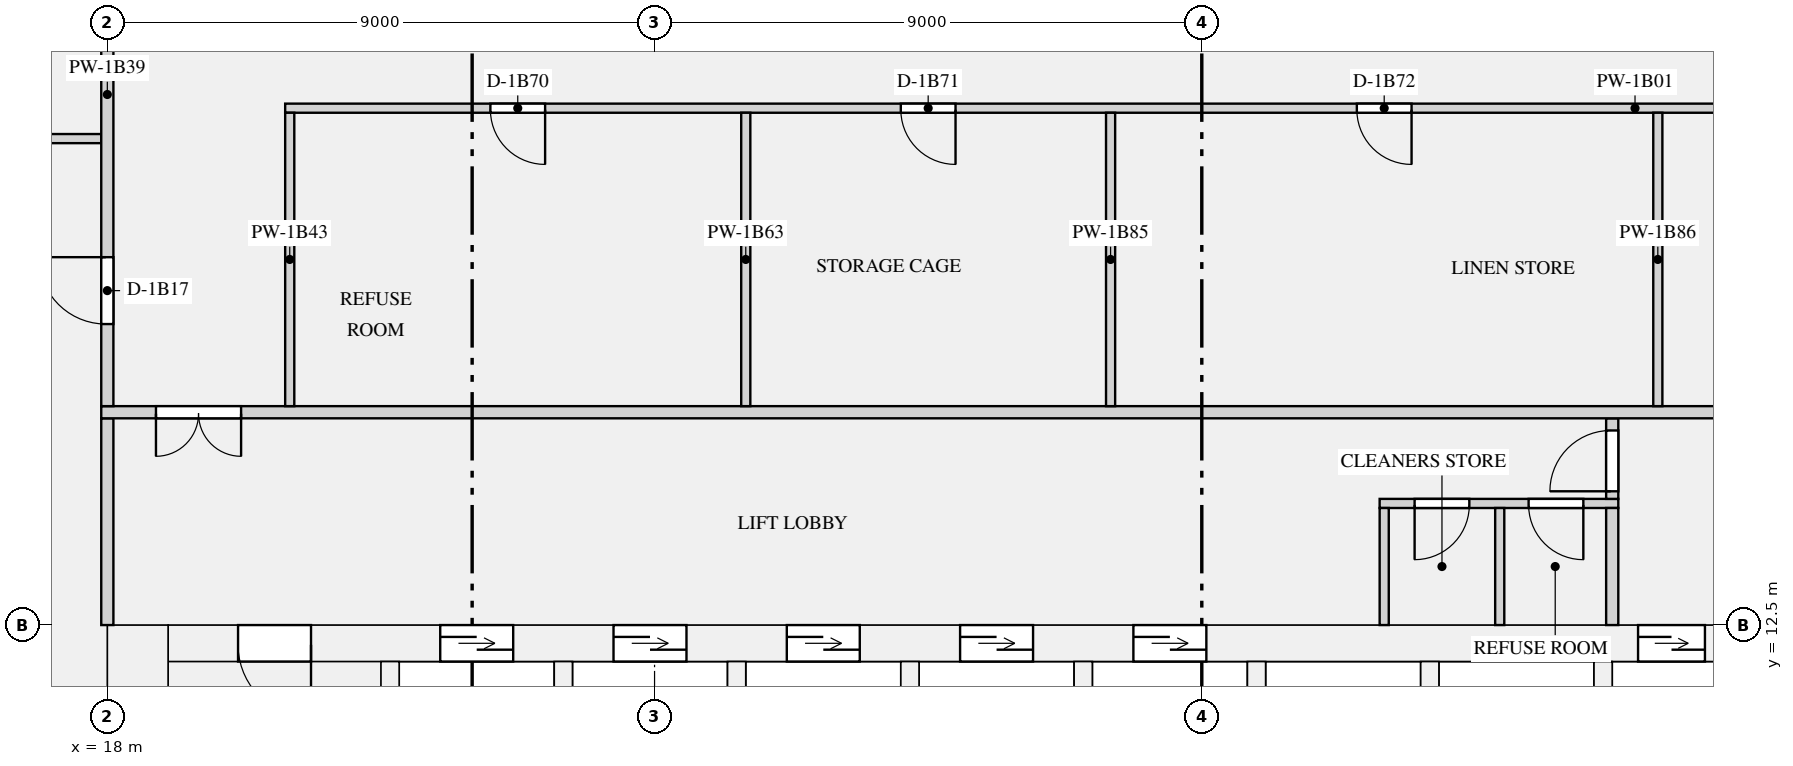
"""IFC4 building model, lengths in metres.
Left out: names, types, materials, properties, quantities, classifications, styles, units other than length and angle.
Written with IfcOpenShell. Run it as: python <this file> out.ifc"""

import sys

from ifc_helpers import new_model, si_unit, direction, frame, frame_2d, origin, place, context, subcontext, project, spatial, rectangle, extrude, element, fill, save


model = new_model("IFC4")
c1 = context("Model", 3, precision=1e-05, world=origin(), true_north=direction((0.0, 1.0)))
c2 = subcontext(c1, "Body", "Model", "MODEL_VIEW")
j1 = project(units=[si_unit("LENGTHUNIT", "METRE"), si_unit("PLANEANGLEUNIT", "RADIAN")], contexts=[c1])
p1 = place(None, origin())
s1 = spatial("IfcSite", under=j1, at=p1, CompositionType="ELEMENT")
p2 = place(p1, origin())
s2 = spatial("IfcBuilding", under=s1, at=p2, CompositionType="ELEMENT")
p3 = place(p2, frame((0.0, 0.0, 28.95)))
s3 = spatial("IfcBuildingStorey", under=s2, at=p3, CompositionType="ELEMENT", Elevation=28.95)
p4 = place(p3, frame((18.5, 0.0, 0.0), z_axis=(0.0, 0.0, 1.0), x_axis=(0.0, 1.0, 0.0)))
e1 = element("IfcWall", 1, at=p4, inside=s3, PredefinedType="SHEAR", context=c2, shape_type="SweptSolid", body=[
    extrude(rectangle(XDim=12.5, YDim=1.0, at=frame_2d((6.25, 0.0))), origin(), (0.0, 0.0, 1.0), 3.15),
])
p5 = place(p3, frame((19.0, 12.2, 0.0), z_axis=(0.0, 0.0, 1.0), x_axis=(1.0, 0.0, 0.0)))
e2 = element("IfcWall", 2, at=p5, inside=s3, PredefinedType="SHEAR", context=c2, shape_type="SweptSolid", body=[
    extrude(rectangle(XDim=34.0, YDim=0.6, at=frame_2d((17.0, 0.0))), origin(), (0.0, 0.0, 1.0), 3.15),
])
p6 = place(p5, frame((4.475, 0.0, 0.0)))
e3 = element("IfcOpeningElement", 3, at=p6, cuts=e2, PredefinedType="OPENING", context=c2, shape_type="SweptSolid", body=[
    extrude(rectangle(XDim=1.2, YDim=2.1, at=frame_2d((0.6, 1.05))), frame((0.0, 0.31, 0.0), z_axis=(0.0, -1.0, 0.0), x_axis=(1.0, 0.0, 0.0)), (0.0, 0.0, 1.0), 0.62),
])
p7 = place(p5, frame((7.325, 0.0, 0.0)))
e4 = element("IfcOpeningElement", 4, at=p7, cuts=e2, PredefinedType="OPENING", context=c2, shape_type="SweptSolid", body=[
    extrude(rectangle(XDim=1.2, YDim=2.1, at=frame_2d((0.6, 1.05))), frame((0.0, 0.31, 0.0), z_axis=(0.0, -1.0, 0.0), x_axis=(1.0, 0.0, 0.0)), (0.0, 0.0, 1.0), 0.62),
])
p8 = place(p5, frame((10.175, 0.0, 0.0)))
e5 = element("IfcOpeningElement", 5, at=p8, cuts=e2, PredefinedType="OPENING", context=c2, shape_type="SweptSolid", body=[
    extrude(rectangle(XDim=1.2, YDim=2.1, at=frame_2d((0.6, 1.05))), frame((0.0, 0.31, 0.0), z_axis=(0.0, -1.0, 0.0), x_axis=(1.0, 0.0, 0.0)), (0.0, 0.0, 1.0), 0.62),
])
p9 = place(p5, frame((13.025, 0.0, 0.0)))
e6 = element("IfcOpeningElement", 6, at=p9, cuts=e2, PredefinedType="OPENING", context=c2, shape_type="SweptSolid", body=[
    extrude(rectangle(XDim=1.2, YDim=2.1, at=frame_2d((0.6, 1.05))), frame((0.0, 0.31, 0.0), z_axis=(0.0, -1.0, 0.0), x_axis=(1.0, 0.0, 0.0)), (0.0, 0.0, 1.0), 0.62),
])
p10 = place(p5, frame((15.875, 0.0, 0.0)))
e7 = element("IfcOpeningElement", 7, at=p10, cuts=e2, PredefinedType="OPENING", context=c2, shape_type="SweptSolid", body=[
    extrude(rectangle(XDim=1.2, YDim=2.1, at=frame_2d((0.6, 1.05))), frame((0.0, 0.31, 0.0), z_axis=(0.0, -1.0, 0.0), x_axis=(1.0, 0.0, 0.0)), (0.0, 0.0, 1.0), 0.62),
])
p11 = place(p5, frame((24.175, 0.0, 0.0)))
e8 = element("IfcOpeningElement", 8, at=p11, cuts=e2, PredefinedType="OPENING", context=c2, shape_type="SweptSolid", body=[
    extrude(rectangle(XDim=1.1, YDim=2.1, at=frame_2d((0.55, 1.05))), frame((0.0, 0.31, 0.0), z_axis=(0.0, -1.0, 0.0), x_axis=(1.0, 0.0, 0.0)), (0.0, 0.0, 1.0), 0.62),
])
p12 = place(p5, frame((26.425, 0.0, 0.0)))
e9 = element("IfcOpeningElement", 9, at=p12, cuts=e2, PredefinedType="OPENING", context=c2, shape_type="SweptSolid", body=[
    extrude(rectangle(XDim=1.1, YDim=2.1, at=frame_2d((0.55, 1.05))), frame((0.0, 0.31, 0.0), z_axis=(0.0, -1.0, 0.0), x_axis=(1.0, 0.0, 0.0)), (0.0, 0.0, 1.0), 0.62),
])
p13 = place(p5, frame((28.675, 0.0, 0.0)))
e10 = element("IfcOpeningElement", 10, at=p13, cuts=e2, PredefinedType="OPENING", context=c2, shape_type="SweptSolid", body=[
    extrude(rectangle(XDim=1.1, YDim=2.1, at=frame_2d((0.55, 1.05))), frame((0.0, 0.31, 0.0), z_axis=(0.0, -1.0, 0.0), x_axis=(1.0, 0.0, 0.0)), (0.0, 0.0, 1.0), 0.62),
])
p14 = place(p5, frame((1.15, 0.0, 0.0)))
e11 = element("IfcOpeningElement", 11, at=p14, cuts=e2, PredefinedType="OPENING", context=c2, shape_type="SweptSolid", body=[
    extrude(rectangle(XDim=1.2, YDim=2.1, at=frame_2d((0.6, 1.05))), frame((0.0, 0.31, 0.0), z_axis=(0.0, -1.0, 0.0), x_axis=(1.0, 0.0, 0.0)), (0.0, 0.0, 1.0), 0.62),
])
p15 = place(p5, frame((31.65, 0.0, 0.0)))
e12 = element("IfcOpeningElement", 12, at=p15, cuts=e2, PredefinedType="OPENING", context=c2, shape_type="SweptSolid", body=[
    extrude(rectangle(XDim=1.2, YDim=2.1, at=frame_2d((0.6, 1.05))), frame((0.0, 0.31, 0.0), z_axis=(0.0, -1.0, 0.0), x_axis=(1.0, 0.0, 0.0)), (0.0, 0.0, 1.0), 0.62),
])
for number, where, z_axis, x_axis in (
    (13, (22.65, 9.35, 0.0), (0.0, 0.0, 1.0), (0.0, 1.0, 0.0)),
    (14, (25.5, 9.35, 0.0), (0.0, 0.0, 1.0), (0.0, 1.0, 0.0)),
    (15, (28.35, 9.35, 0.0), (0.0, 0.0, 1.0), (0.0, 1.0, 0.0)),
    (16, (31.2, 9.35, 0.0), (0.0, 0.0, 1.0), (0.0, 1.0, 0.0)),
    (17, (34.05, 9.35, 0.0), (0.0, 0.0, 1.0), (0.0, 1.0, 0.0)),
    (18, (36.9, 9.35, 0.0), (0.0, 0.0, 1.0), (0.0, 1.0, 0.0)),
    (19, (39.75, 9.35, 0.0), (0.0, 0.0, 1.0), (0.0, 1.0, 0.0)),
):
    element("IfcWall", number, at=place(p3, frame(where, z_axis=z_axis, x_axis=x_axis)), inside=s3, PredefinedType="SHEAR", context=c2, shape_type="SweptSolid", body=[
        extrude(rectangle(XDim=2.55, YDim=0.3, at=frame_2d((1.275, 0.0))), origin(), (0.0, 0.0, 1.0), 3.15),
    ])
p16 = place(p3, frame((42.6, 8.25, 0.0), z_axis=(0.0, 0.0, 1.0), x_axis=(0.0, 1.0, 0.0)))
e20 = element("IfcWall", 20, at=p16, inside=s3, PredefinedType="SHEAR", context=c2, shape_type="SweptSolid", body=[
    extrude(rectangle(XDim=3.65, YDim=0.3, at=frame_2d((1.825, 0.0))), origin(), (0.0, 0.0, 1.0), 3.15),
])
p17 = place(p3, frame((38.925, 14.5, 0.0), z_axis=(0.0, 0.0, 1.0), x_axis=(1.0, 0.0, 0.0)))
e21 = element("IfcWall", 21, at=p17, inside=s3, PredefinedType="PARTITIONING", context=c2, shape_type="SweptSolid", body=[
    extrude(rectangle(XDim=3.925, YDim=0.15, at=frame_2d((1.962, 0.0))), origin(), (0.0, 0.0, 1.0), 2.83),
])
p18 = place(p17, frame((0.575, 0.0, 0.0)))
e22 = element("IfcOpeningElement", 22, at=p18, cuts=e21, PredefinedType="OPENING", context=c2, shape_type="SweptSolid", body=[
    extrude(rectangle(XDim=0.9, YDim=2.1, at=frame_2d((0.45, 1.05))), frame((0.0, 0.085, 0.0), z_axis=(0.0, -1.0, 0.0), x_axis=(1.0, 0.0, 0.0)), (0.0, 0.0, 1.0), 0.17),
])
p19 = place(p17, frame((2.45, 0.0, 0.0)))
e23 = element("IfcOpeningElement", 23, at=p19, cuts=e21, PredefinedType="OPENING", context=c2, shape_type="SweptSolid", body=[
    extrude(rectangle(XDim=0.9, YDim=2.1, at=frame_2d((0.45, 1.05))), frame((0.0, 0.085, 0.0), z_axis=(0.0, -1.0, 0.0), x_axis=(1.0, 0.0, 0.0)), (0.0, 0.0, 1.0), 0.17),
])
p20 = place(p3, frame((18.0, 12.5, 0.0), z_axis=(0.0, 0.0, 1.0), x_axis=(0.0, 1.0, 0.0)))
e24 = element("IfcWall", 24, at=p20, inside=s3, PredefinedType="PARTITIONING", context=c2, shape_type="SweptSolid", body=[
    extrude(rectangle(XDim=3.4, YDim=0.2, at=frame_2d((1.7, 0.0))), origin(), (0.0, 0.0, 1.0), 2.83),
])
for number, where, z_axis, x_axis in (
    (25, (39.0, 12.5, 0.0), (0.0, 0.0, 1.0), (0.0, 1.0, 0.0)),
    (26, (40.9, 12.5, 0.0), (0.0, 0.0, 1.0), (0.0, 1.0, 0.0)),
):
    element("IfcWall", number, at=place(p3, frame(where, z_axis=z_axis, x_axis=x_axis)), inside=s3, PredefinedType="PARTITIONING", context=c2, shape_type="SweptSolid", body=[
        extrude(rectangle(XDim=1.925, YDim=0.15, at=frame_2d((0.962, 0.0))), origin(), (0.0, 0.0, 1.0), 2.83),
    ])
p21 = place(p3, frame((42.75, 12.5, 0.0), z_axis=(0.0, 0.0, 1.0), x_axis=(0.0, 1.0, 0.0)))
e27 = element("IfcWall", 27, at=p21, inside=s3, PredefinedType="PARTITIONING", context=c2, shape_type="SweptSolid", body=[
    extrude(rectangle(XDim=1.925, YDim=0.2, at=frame_2d((0.962, 0.0))), origin(), (0.0, 0.0, 1.0), 2.83),
])
p22 = place(p3, frame((42.75, 14.575, 0.0), z_axis=(0.0, 0.0, 1.0), x_axis=(0.0, 1.0, 0.0)))
e28 = element("IfcWall", 28, at=p22, inside=s3, PredefinedType="PARTITIONING", context=c2, shape_type="SweptSolid", body=[
    extrude(rectangle(XDim=1.325, YDim=0.2, at=frame_2d((0.663, 0.0))), origin(), (0.0, 0.0, 1.0), 2.83),
])
p23 = place(p22, frame((0.125, 0.0, 0.0)))
e29 = element("IfcOpeningElement", 29, at=p23, cuts=e28, PredefinedType="OPENING", context=c2, shape_type="SweptSolid", body=[
    extrude(rectangle(XDim=1.0, YDim=2.1, at=frame_2d((0.5, 1.05))), frame((0.0, 0.11, 0.0), z_axis=(0.0, -1.0, 0.0), x_axis=(1.0, 0.0, 0.0)), (0.0, 0.0, 1.0), 0.22),
])
p24 = place(p3, frame((20.925, 21.0, 0.0), z_axis=(0.0, 0.0, 1.0), x_axis=(1.0, 0.0, 0.0)))
e30 = element("IfcWall", 30, at=p24, inside=s3, PredefinedType="PARTITIONING", context=c2, shape_type="SweptSolid", body=[
    extrude(rectangle(XDim=30.15, YDim=0.15, at=frame_2d((15.075, 0.0))), origin(), (0.0, 0.0, 1.0), 2.83),
])
p25 = place(p24, frame((3.375, 0.0, 0.0)))
e31 = element("IfcOpeningElement", 31, at=p25, cuts=e30, PredefinedType="OPENING", context=c2, shape_type="SweptSolid", body=[
    extrude(rectangle(XDim=0.9, YDim=2.1, at=frame_2d((0.45, 1.05))), frame((0.0, 0.085, 0.0), z_axis=(0.0, -1.0, 0.0), x_axis=(1.0, 0.0, 0.0)), (0.0, 0.0, 1.0), 0.17),
])
p26 = place(p24, frame((10.125, 0.0, 0.0)))
e32 = element("IfcOpeningElement", 32, at=p26, cuts=e30, PredefinedType="OPENING", context=c2, shape_type="SweptSolid", body=[
    extrude(rectangle(XDim=0.9, YDim=2.1, at=frame_2d((0.45, 1.05))), frame((0.0, 0.085, 0.0), z_axis=(0.0, -1.0, 0.0), x_axis=(1.0, 0.0, 0.0)), (0.0, 0.0, 1.0), 0.17),
])
p27 = place(p24, frame((17.625, 0.0, 0.0)))
e33 = element("IfcOpeningElement", 33, at=p27, cuts=e30, PredefinedType="OPENING", context=c2, shape_type="SweptSolid", body=[
    extrude(rectangle(XDim=0.9, YDim=2.1, at=frame_2d((0.45, 1.05))), frame((0.0, 0.085, 0.0), z_axis=(0.0, -1.0, 0.0), x_axis=(1.0, 0.0, 0.0)), (0.0, 0.0, 1.0), 0.17),
])
p28 = place(p24, frame((25.875, 0.0, 0.0)))
e34 = element("IfcOpeningElement", 34, at=p28, cuts=e30, PredefinedType="OPENING", context=c2, shape_type="SweptSolid", body=[
    extrude(rectangle(XDim=0.9, YDim=2.1, at=frame_2d((0.45, 1.05))), frame((0.0, 0.085, 0.0), z_axis=(0.0, -1.0, 0.0), x_axis=(1.0, 0.0, 0.0)), (0.0, 0.0, 1.0), 0.17),
])
p29 = place(p3, frame((13.575, 20.5, 0.0), z_axis=(0.0, 0.0, 1.0), x_axis=(1.0, 0.0, 0.0)))
e35 = element("IfcWall", 35, at=p29, inside=s3, PredefinedType="PARTITIONING", context=c2, shape_type="SweptSolid", body=[
    extrude(rectangle(XDim=4.325, YDim=0.15, at=frame_2d((2.163, 0.0))), origin(), (0.0, 0.0, 1.0), 2.83),
])
p30 = place(p29, frame((1.725, 0.0, 0.0)))
e36 = element("IfcOpeningElement", 36, at=p30, cuts=e35, PredefinedType="OPENING", context=c2, shape_type="SweptSolid", body=[
    extrude(rectangle(XDim=0.9, YDim=2.1, at=frame_2d((0.45, 1.05))), frame((0.0, 0.085, 0.0), z_axis=(0.0, -1.0, 0.0), x_axis=(1.0, 0.0, 0.0)), (0.0, 0.0, 1.0), 0.17),
])
p31 = place(p3, frame((17.9, 16.0, 0.0), z_axis=(0.0, 0.0, 1.0), x_axis=(1.0, 0.0, 0.0)))
e37 = element("IfcWall", 37, at=p31, inside=s3, PredefinedType="PARTITIONING", context=c2, shape_type="SweptSolid", body=[
    extrude(rectangle(XDim=36.2, YDim=0.2, at=frame_2d((18.1, 0.0))), origin(), (0.0, 0.0, 1.0), 2.83),
])
p32 = place(p31, frame((0.9, 0.0, 0.0)))
e38 = element("IfcOpeningElement", 38, at=p32, cuts=e37, PredefinedType="OPENING", context=c2, shape_type="SweptSolid", body=[
    extrude(rectangle(XDim=1.4, YDim=2.1, at=frame_2d((0.7, 1.05))), frame((0.0, 0.11, 0.0), z_axis=(0.0, -1.0, 0.0), x_axis=(1.0, 0.0, 0.0)), (0.0, 0.0, 1.0), 0.22),
])
p33 = place(p31, frame((33.9, 0.0, 0.0)))
e39 = element("IfcOpeningElement", 39, at=p33, cuts=e37, PredefinedType="OPENING", context=c2, shape_type="SweptSolid", body=[
    extrude(rectangle(XDim=1.4, YDim=2.1, at=frame_2d((0.7, 1.05))), frame((0.0, 0.11, 0.0), z_axis=(0.0, -1.0, 0.0), x_axis=(1.0, 0.0, 0.0)), (0.0, 0.0, 1.0), 0.22),
])
p34 = place(p3, frame((18.0, 16.1, 0.0), z_axis=(0.0, 0.0, 1.0), x_axis=(0.0, 1.0, 0.0)))
e40 = element("IfcWall", 40, at=p34, inside=s3, PredefinedType="PARTITIONING", context=c2, shape_type="SweptSolid", body=[
    extrude(rectangle(XDim=7.8, YDim=0.2, at=frame_2d((3.9, 0.0))), origin(), (0.0, 0.0, 1.0), 2.83),
])
p35 = place(p34, frame((1.35, 0.0, 0.0)))
e41 = element("IfcOpeningElement", 41, at=p35, cuts=e40, PredefinedType="OPENING", context=c2, shape_type="SweptSolid", body=[
    extrude(rectangle(XDim=1.1, YDim=2.1, at=frame_2d((0.55, 1.05))), frame((0.0, 0.11, 0.0), z_axis=(0.0, -1.0, 0.0), x_axis=(1.0, 0.0, 0.0)), (0.0, 0.0, 1.0), 0.22),
])
for number, where, z_axis, x_axis in (
    (42, (21.0, 16.1, 0.0), (0.0, 0.0, 1.0), (0.0, 1.0, 0.0)),
    (43, (28.5, 16.1, 0.0), (0.0, 0.0, 1.0), (0.0, 1.0, 0.0)),
    (44, (34.5, 16.1, 0.0), (0.0, 0.0, 1.0), (0.0, 1.0, 0.0)),
    (45, (43.5, 16.1, 0.0), (0.0, 0.0, 1.0), (0.0, 1.0, 0.0)),
):
    element("IfcWall", number, at=place(p3, frame(where, z_axis=z_axis, x_axis=x_axis)), inside=s3, PredefinedType="PARTITIONING", context=c2, shape_type="SweptSolid", body=[
        extrude(rectangle(XDim=4.825, YDim=0.15, at=frame_2d((2.413, 0.0))), origin(), (0.0, 0.0, 1.0), 2.83),
    ])
p36 = place(p6, origin())
e46 = element("IfcDoor", 46, at=p36, inside=s3, OperationType="DOUBLE_DOOR_SLIDING", PredefinedType="DOOR", context=c2, shape_type="SweptSolid", body=[
    extrude(rectangle(XDim=1.2, YDim=2.1, at=frame_2d((0.6, 1.05))), frame((0.0, 0.025, 0.0), z_axis=(0.0, -1.0, 0.0), x_axis=(1.0, 0.0, 0.0)), (0.0, 0.0, 1.0), 0.05),
])
fill(e3, e46)
p37 = place(p7, origin())
e47 = element("IfcDoor", 47, at=p37, inside=s3, OperationType="DOUBLE_DOOR_SLIDING", PredefinedType="DOOR", context=c2, shape_type="SweptSolid", body=[
    extrude(rectangle(XDim=1.2, YDim=2.1, at=frame_2d((0.6, 1.05))), frame((0.0, 0.025, 0.0), z_axis=(0.0, -1.0, 0.0), x_axis=(1.0, 0.0, 0.0)), (0.0, 0.0, 1.0), 0.05),
])
fill(e4, e47)
p38 = place(p8, origin())
e48 = element("IfcDoor", 48, at=p38, inside=s3, OperationType="DOUBLE_DOOR_SLIDING", PredefinedType="DOOR", context=c2, shape_type="SweptSolid", body=[
    extrude(rectangle(XDim=1.2, YDim=2.1, at=frame_2d((0.6, 1.05))), frame((0.0, 0.025, 0.0), z_axis=(0.0, -1.0, 0.0), x_axis=(1.0, 0.0, 0.0)), (0.0, 0.0, 1.0), 0.05),
])
fill(e5, e48)
p39 = place(p9, origin())
e49 = element("IfcDoor", 49, at=p39, inside=s3, OperationType="DOUBLE_DOOR_SLIDING", PredefinedType="DOOR", context=c2, shape_type="SweptSolid", body=[
    extrude(rectangle(XDim=1.2, YDim=2.1, at=frame_2d((0.6, 1.05))), frame((0.0, 0.025, 0.0), z_axis=(0.0, -1.0, 0.0), x_axis=(1.0, 0.0, 0.0)), (0.0, 0.0, 1.0), 0.05),
])
fill(e6, e49)
p40 = place(p10, origin())
e50 = element("IfcDoor", 50, at=p40, inside=s3, OperationType="DOUBLE_DOOR_SLIDING", PredefinedType="DOOR", context=c2, shape_type="SweptSolid", body=[
    extrude(rectangle(XDim=1.2, YDim=2.1, at=frame_2d((0.6, 1.05))), frame((0.0, 0.025, 0.0), z_axis=(0.0, -1.0, 0.0), x_axis=(1.0, 0.0, 0.0)), (0.0, 0.0, 1.0), 0.05),
])
fill(e7, e50)
p41 = place(p11, origin())
e51 = element("IfcDoor", 51, at=p41, inside=s3, OperationType="DOUBLE_DOOR_SLIDING", PredefinedType="DOOR", context=c2, shape_type="SweptSolid", body=[
    extrude(rectangle(XDim=1.1, YDim=2.1, at=frame_2d((0.55, 1.05))), frame((0.0, 0.025, 0.0), z_axis=(0.0, -1.0, 0.0), x_axis=(1.0, 0.0, 0.0)), (0.0, 0.0, 1.0), 0.05),
])
fill(e8, e51)
p42 = place(p18, frame((0.9, 0.0, 0.0), z_axis=(0.0, 0.0, 1.0), x_axis=(-1.0, 0.0, 0.0)))
e52 = element("IfcDoor", 52, at=p42, inside=s3, OperationType="SINGLE_SWING_RIGHT", PredefinedType="DOOR", context=c2, shape_type="SweptSolid", body=[
    extrude(rectangle(XDim=0.9, YDim=2.1, at=frame_2d((0.45, 1.05))), frame((0.0, 0.025, 0.0), z_axis=(0.0, -1.0, 0.0), x_axis=(1.0, 0.0, 0.0)), (0.0, 0.0, 1.0), 0.05),
])
fill(e22, e52)
p43 = place(p19, frame((0.9, 0.0, 0.0), z_axis=(0.0, 0.0, 1.0), x_axis=(-1.0, 0.0, 0.0)))
e53 = element("IfcDoor", 53, at=p43, inside=s3, OperationType="SINGLE_SWING_LEFT", PredefinedType="DOOR", context=c2, shape_type="SweptSolid", body=[
    extrude(rectangle(XDim=0.9, YDim=2.1, at=frame_2d((0.45, 1.05))), frame((0.0, 0.025, 0.0), z_axis=(0.0, -1.0, 0.0), x_axis=(1.0, 0.0, 0.0)), (0.0, 0.0, 1.0), 0.05),
])
fill(e23, e53)
p44 = place(p14, frame((1.2, 0.0, 0.0), z_axis=(0.0, 0.0, 1.0), x_axis=(-1.0, 0.0, 0.0)))
e54 = element("IfcDoor", 54, at=p44, inside=s3, OperationType="SINGLE_SWING_LEFT", PredefinedType="DOOR", context=c2, shape_type="SweptSolid", body=[
    extrude(rectangle(XDim=1.2, YDim=2.1, at=frame_2d((0.6, 1.05))), frame((0.0, 0.025, 0.0), z_axis=(0.0, -1.0, 0.0), x_axis=(1.0, 0.0, 0.0)), (0.0, 0.0, 1.0), 0.05),
])
fill(e11, e54)
p45 = place(p23, origin())
e55 = element("IfcDoor", 55, at=p45, inside=s3, OperationType="SINGLE_SWING_LEFT", PredefinedType="DOOR", context=c2, shape_type="SweptSolid", body=[
    extrude(rectangle(XDim=1.0, YDim=2.1, at=frame_2d((0.5, 1.05))), frame((0.0, 0.025, 0.0), z_axis=(0.0, -1.0, 0.0), x_axis=(1.0, 0.0, 0.0)), (0.0, 0.0, 1.0), 0.05),
])
fill(e29, e55)
p46 = place(p32, frame((1.4, 0.0, 0.0), z_axis=(0.0, 0.0, 1.0), x_axis=(-1.0, 0.0, 0.0)))
e56 = element("IfcDoor", 56, at=p46, inside=s3, OperationType="DOUBLE_DOOR_SINGLE_SWING", PredefinedType="DOOR", context=c2, shape_type="SweptSolid", body=[
    extrude(rectangle(XDim=1.4, YDim=2.1, at=frame_2d((0.7, 1.05))), frame((0.0, 0.025, 0.0), z_axis=(0.0, -1.0, 0.0), x_axis=(1.0, 0.0, 0.0)), (0.0, 0.0, 1.0), 0.05),
])
fill(e38, e56)
p47 = place(p35, origin())
e57 = element("IfcDoor", 57, at=p47, inside=s3, OperationType="SINGLE_SWING_RIGHT", PredefinedType="DOOR", context=c2, shape_type="SweptSolid", body=[
    extrude(rectangle(XDim=1.1, YDim=2.1, at=frame_2d((0.55, 1.05))), frame((0.0, 0.025, 0.0), z_axis=(0.0, -1.0, 0.0), x_axis=(1.0, 0.0, 0.0)), (0.0, 0.0, 1.0), 0.05),
])
fill(e41, e57)
p48 = place(p25, frame((0.9, 0.0, 0.0), z_axis=(0.0, 0.0, 1.0), x_axis=(-1.0, 0.0, 0.0)))
e58 = element("IfcDoor", 58, at=p48, inside=s3, OperationType="SINGLE_SWING_LEFT", PredefinedType="DOOR", context=c2, shape_type="SweptSolid", body=[
    extrude(rectangle(XDim=0.9, YDim=2.1, at=frame_2d((0.45, 1.05))), frame((0.0, 0.025, 0.0), z_axis=(0.0, -1.0, 0.0), x_axis=(1.0, 0.0, 0.0)), (0.0, 0.0, 1.0), 0.05),
])
fill(e31, e58)
p49 = place(p26, frame((0.9, 0.0, 0.0), z_axis=(0.0, 0.0, 1.0), x_axis=(-1.0, 0.0, 0.0)))
e59 = element("IfcDoor", 59, at=p49, inside=s3, OperationType="SINGLE_SWING_LEFT", PredefinedType="DOOR", context=c2, shape_type="SweptSolid", body=[
    extrude(rectangle(XDim=0.9, YDim=2.1, at=frame_2d((0.45, 1.05))), frame((0.0, 0.025, 0.0), z_axis=(0.0, -1.0, 0.0), x_axis=(1.0, 0.0, 0.0)), (0.0, 0.0, 1.0), 0.05),
])
fill(e32, e59)
p50 = place(p27, frame((0.9, 0.0, 0.0), z_axis=(0.0, 0.0, 1.0), x_axis=(-1.0, 0.0, 0.0)))
e60 = element("IfcDoor", 60, at=p50, inside=s3, OperationType="SINGLE_SWING_LEFT", PredefinedType="DOOR", context=c2, shape_type="SweptSolid", body=[
    extrude(rectangle(XDim=0.9, YDim=2.1, at=frame_2d((0.45, 1.05))), frame((0.0, 0.025, 0.0), z_axis=(0.0, -1.0, 0.0), x_axis=(1.0, 0.0, 0.0)), (0.0, 0.0, 1.0), 0.05),
])
fill(e33, e60)
save(model, sys.argv[1])
